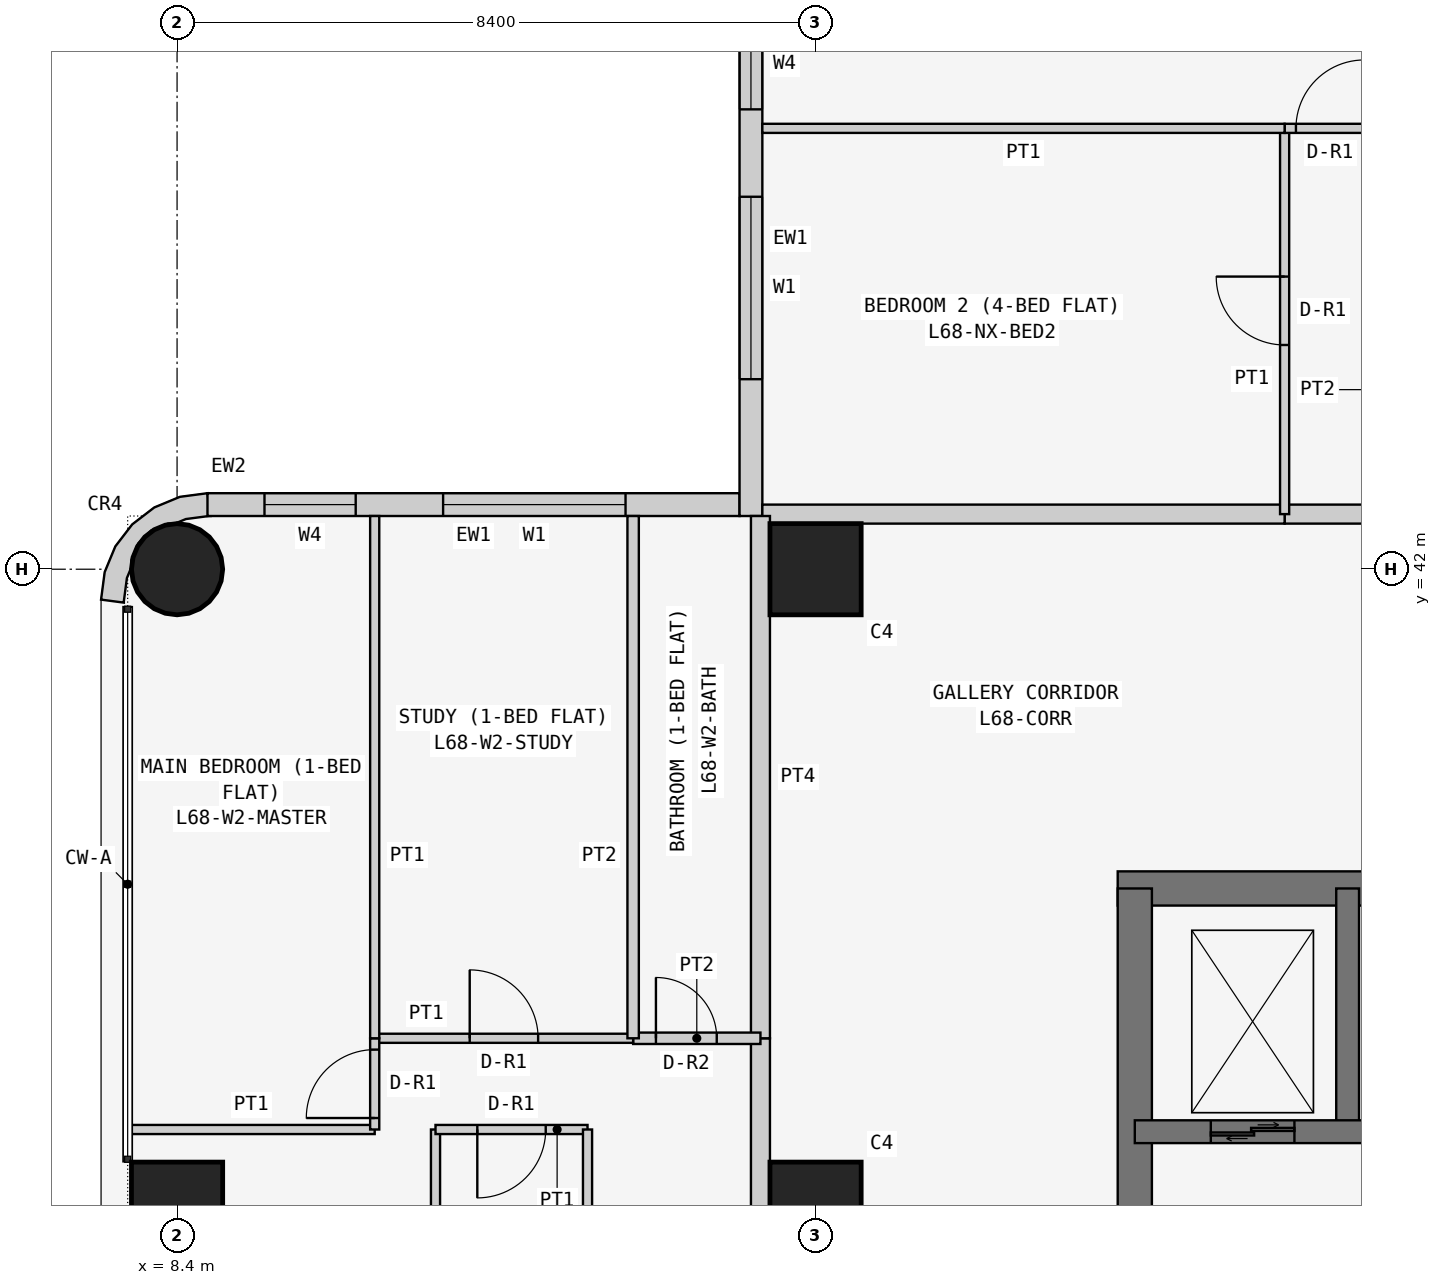
"""IFC4 building model, lengths in metres.
Left out: names, types, materials, properties, quantities, classifications, styles, units other than length and angle.
Written with IfcOpenShell. Run it as: python <this file> out.ifc"""

import sys

from ifc_helpers import new_model, si_unit, direction, frame, frame_2d, origin, origin_2d, place, context, subcontext, project, spatial, polyline, rectangle, circle, outline, extrude, element, fill, save


model = new_model("IFC4")
c1 = context("Model", 3, precision=1e-05, world=origin(), true_north=direction((0.0, 1.0)))
c2 = subcontext(c1, "Body", "Model", "MODEL_VIEW")
j1 = project(units=[si_unit("LENGTHUNIT", "METRE"), si_unit("PLANEANGLEUNIT", "RADIAN")], contexts=[c1])
p1 = place(None, origin())
s1 = spatial("IfcSite", under=j1, at=p1, CompositionType="ELEMENT")
p2 = place(p1, origin())
s2 = spatial("IfcBuilding", under=s1, at=p2, CompositionType="ELEMENT")
p3 = place(p2, frame((0.0, 0.0, 261.3)))
s3 = spatial("IfcBuildingStorey", under=s2, at=p3, CompositionType="ELEMENT", Elevation=261.3)
p4 = place(p3, frame((8.4, 33.6, 0.0), z_axis=(0.0, 0.0, 1.0), x_axis=(1.0, 0.0, 0.0)))
e1 = element("IfcColumn", 1, at=p4, inside=s3, PredefinedType="COLUMN", context=c2, shape_type="SweptSolid", body=[
    extrude(rectangle(XDim=1.2, YDim=1.2, at=origin_2d()), origin(), (0.0, 0.0, 1.0), 3.6),
])
p5 = place(p3, frame((8.4, 42.0, 0.0), z_axis=(0.0, 0.0, 1.0), x_axis=(1.0, 0.0, 0.0)))
e2 = element("IfcColumn", 2, at=p5, inside=s3, PredefinedType="COLUMN", context=c2, shape_type="SweptSolid", body=[
    extrude(circle(Radius=0.6, at=origin_2d()), origin(), (0.0, 0.0, 1.0), 3.6),
])
for number, where, z_axis, x_axis in (
    (3, (16.8, 33.6, 0.0), (0.0, 0.0, 1.0), (1.0, 0.0, 0.0)),
    (4, (16.8, 42.0, 0.0), (0.0, 0.0, 1.0), (1.0, 0.0, 0.0)),
):
    element("IfcColumn", number, at=place(p3, frame(where, z_axis=z_axis, x_axis=x_axis)), inside=s3, PredefinedType="COLUMN", context=c2, shape_type="SweptSolid", body=[
        extrude(rectangle(XDim=1.2, YDim=1.2, at=origin_2d()), origin(), (0.0, 0.0, 1.0), 3.6),
    ])
p6 = place(p3, frame((37.8, 37.8, 0.0), z_axis=(0.0, 0.0, 1.0), x_axis=(-1.0, 0.0, 0.0)))
e5 = element("IfcWall", 5, at=p6, inside=s3, PredefinedType="SHEAR", context=c2, shape_type="SweptSolid", body=[
    extrude(rectangle(XDim=17.025, YDim=0.45, at=frame_2d((8.513, 0.0))), origin(), (0.0, 0.0, 1.0), 3.6),
])
p7 = place(p3, frame((21.0, 37.8, 0.0), z_axis=(0.0, 0.0, 1.0), x_axis=(0.0, -1.0, 0.0)))
e6 = element("IfcWall", 6, at=p7, inside=s3, PredefinedType="SHEAR", context=c2, shape_type="SweptSolid", body=[
    extrude(rectangle(XDim=17.025, YDim=0.45, at=frame_2d((8.513, 0.0))), origin(), (0.0, 0.0, 1.0), 3.6),
])
p8 = place(p7, frame((5.4, 0.0, 0.0)))
e7 = element("IfcOpeningElement", 7, at=p8, cuts=e6, PredefinedType="OPENING", context=c2, shape_type="SweptSolid", body=[
    extrude(rectangle(XDim=1.2, YDim=2.1, at=frame_2d((0.6, 1.05))), frame((0.0, 0.235, 0.0), z_axis=(0.0, -1.0, 0.0), x_axis=(1.0, 0.0, 0.0)), (0.0, 0.0, 1.0), 0.47),
])
p9 = place(p3, frame((21.0, 34.6, 0.0), z_axis=(0.0, 0.0, 1.0), x_axis=(1.0, 0.0, 0.0)))
e8 = element("IfcWall", 8, at=p9, inside=s3, PredefinedType="SHEAR", context=c2, shape_type="SweptSolid", body=[
    extrude(rectangle(XDim=11.2, YDim=0.3, at=frame_2d((5.6, 0.0))), origin(), (0.0, 0.0, 1.0), 3.6),
])
p10 = place(p9, frame((9.35, 0.0, 0.0)))
e9 = element("IfcOpeningElement", 9, at=p10, cuts=e8, PredefinedType="OPENING", context=c2, shape_type="SweptSolid", body=[
    extrude(rectangle(XDim=0.9, YDim=2.1, at=frame_2d((0.45, 1.05))), frame((0.0, 0.16, 0.0), z_axis=(0.0, -1.0, 0.0), x_axis=(1.0, 0.0, 0.0)), (0.0, 0.0, 1.0), 0.32),
])
p11 = place(p9, frame((1.0, 0.0, 0.0)))
e10 = element("IfcOpeningElement", 10, at=p11, cuts=e8, PredefinedType="OPENING", context=c2, shape_type="SweptSolid", body=[
    extrude(rectangle(XDim=1.1, YDim=2.1, at=frame_2d((0.55, 1.05))), frame((0.0, 0.16, 0.0), z_axis=(0.0, -1.0, 0.0), x_axis=(1.0, 0.0, 0.0)), (0.0, 0.0, 1.0), 0.32),
])
p12 = place(p9, frame((3.65, 0.0, 0.0)))
e11 = element("IfcOpeningElement", 11, at=p12, cuts=e8, PredefinedType="OPENING", context=c2, shape_type="SweptSolid", body=[
    extrude(rectangle(XDim=1.1, YDim=2.1, at=frame_2d((0.55, 1.05))), frame((0.0, 0.16, 0.0), z_axis=(0.0, -1.0, 0.0), x_axis=(1.0, 0.0, 0.0)), (0.0, 0.0, 1.0), 0.32),
])
p13 = place(p9, frame((6.35, 0.0, 0.0)))
e12 = element("IfcOpeningElement", 12, at=p13, cuts=e8, PredefinedType="OPENING", context=c2, shape_type="SweptSolid", body=[
    extrude(rectangle(XDim=1.3, YDim=2.1, at=frame_2d((0.65, 1.05))), frame((0.0, 0.16, 0.0), z_axis=(0.0, -1.0, 0.0), x_axis=(1.0, 0.0, 0.0)), (0.0, 0.0, 1.0), 0.32),
])
p14 = place(p3, frame((23.8, 34.6, 0.0), z_axis=(0.0, 0.0, 1.0), x_axis=(0.0, 1.0, 0.0)))
e13 = element("IfcWall", 13, at=p14, inside=s3, PredefinedType="SHEAR", context=c2, shape_type="SweptSolid", body=[
    extrude(rectangle(XDim=3.2, YDim=0.3, at=frame_2d((1.6, 0.0))), origin(), (0.0, 0.0, 1.0), 3.6),
])
p15 = place(p3, frame((15.8, 42.85, 0.0), z_axis=(0.0, 0.0, 1.0), x_axis=(-1.0, 0.0, 0.0)))
e14 = element("IfcWall", 14, at=p15, inside=s3, PredefinedType="SOLIDWALL", context=c2, shape_type="SweptSolid", body=[
    extrude(rectangle(XDim=7.0, YDim=0.3, at=frame_2d((3.5, 0.0))), origin(), (0.0, 0.0, 1.0), 3.45),
])
p16 = place(p15, frame((1.5, 0.0, 0.9)))
e15 = element("IfcOpeningElement", 15, at=p16, cuts=e14, PredefinedType="OPENING", context=c2, shape_type="SweptSolid", body=[
    extrude(rectangle(XDim=2.4, YDim=1.5, at=frame_2d((1.2, 0.75))), frame((0.0, 0.16, 0.0), z_axis=(0.0, -1.0, 0.0), x_axis=(1.0, 0.0, 0.0)), (0.0, 0.0, 1.0), 0.32),
])
p17 = place(p15, frame((5.05, 0.0, 0.9)))
e16 = element("IfcOpeningElement", 16, at=p17, cuts=e14, PredefinedType="OPENING", context=c2, shape_type="SweptSolid", body=[
    extrude(rectangle(XDim=1.2, YDim=1.5, at=frame_2d((0.6, 0.75))), frame((0.0, 0.16, 0.0), z_axis=(0.0, -1.0, 0.0), x_axis=(1.0, 0.0, 0.0)), (0.0, 0.0, 1.0), 0.32),
])
p18 = place(p3, frame((15.95, 50.0, 0.0), z_axis=(0.0, 0.0, 1.0), x_axis=(0.0, -1.0, 0.0)))
e17 = element("IfcWall", 17, at=p18, inside=s3, PredefinedType="SOLIDWALL", context=c2, shape_type="SweptSolid", body=[
    extrude(rectangle(XDim=7.3, YDim=0.3, at=frame_2d((3.65, 0.0))), origin(), (0.0, 0.0, 1.0), 3.45),
])
p19 = place(p18, frame((3.1, 0.0, 0.9)))
e18 = element("IfcOpeningElement", 18, at=p19, cuts=e17, PredefinedType="OPENING", context=c2, shape_type="SweptSolid", body=[
    extrude(rectangle(XDim=2.4, YDim=1.5, at=frame_2d((1.2, 0.75))), frame((0.0, 0.16, 0.0), z_axis=(0.0, -1.0, 0.0), x_axis=(1.0, 0.0, 0.0)), (0.0, 0.0, 1.0), 0.32),
])
p20 = place(p18, frame((0.75, 0.0, 0.9)))
e19 = element("IfcOpeningElement", 19, at=p20, cuts=e17, PredefinedType="OPENING", context=c2, shape_type="SweptSolid", body=[
    extrude(rectangle(XDim=1.2, YDim=1.5, at=frame_2d((0.6, 0.75))), frame((0.0, 0.16, 0.0), z_axis=(0.0, -1.0, 0.0), x_axis=(1.0, 0.0, 0.0)), (0.0, 0.0, 1.0), 0.32),
])
p21 = place(p3, frame((8.762, 42.576, 0.0), z_axis=(0.0, 0.0, 1.0), x_axis=(-0.707106781187, 0.707106781187, 0.0)))
e20 = element("IfcWall", 20, at=p21, inside=s3, PredefinedType="SOLIDWALL", context=c2, shape_type="SweptSolid", body=[
    extrude(outline(polyline([(0.233, 0.114), (0.047, -0.129), (0.033, -0.143), (0.273, -0.327), (0.495, -0.037), (0.635, 0.3), (0.683, 0.663), (0.635, 1.025), (0.495, 1.363), (0.273, 1.653), (0.033, 1.469), (0.047, 1.455), (0.233, 1.212), (0.292, 1.069), (0.358, 1.003), (0.449, 0.783), (0.449, 0.543), (0.358, 0.322), (0.292, 0.257), (0.233, 0.114)])), origin(), (0.0, 0.0, 1.0), 3.45),
])
p22 = place(p3, frame((22.971, 42.725, 0.0), z_axis=(0.0, 0.0, 1.0), x_axis=(1.0, 0.0, 0.0)))
e21 = element("IfcWall", 21, at=p22, inside=s3, PredefinedType="PARTITIONING", context=c2, shape_type="SweptSolid", body=[
    extrude(rectangle(XDim=1.2, YDim=0.25, at=frame_2d((0.6, 0.0))), origin(), (0.0, 0.0, 1.0), 3.45),
])
p23 = place(p3, frame((16.1, 42.725, 0.0), z_axis=(0.0, 0.0, 1.0), x_axis=(1.0, 0.0, 0.0)))
e22 = element("IfcWall", 22, at=p23, inside=s3, PredefinedType="PARTITIONING", context=c2, shape_type="SweptSolid", body=[
    extrude(rectangle(XDim=6.871, YDim=0.25, at=frame_2d((3.436, 0.0))), origin(), (0.0, 0.0, 1.0), 3.45),
])
p24 = place(p3, frame((16.075, 29.4, 0.0), z_axis=(0.0, 0.0, 1.0), x_axis=(0.0, 1.0, 0.0)))
e23 = element("IfcWall", 23, at=p24, inside=s3, PredefinedType="PARTITIONING", context=c2, shape_type="SweptSolid", body=[
    extrude(rectangle(XDim=6.429, YDim=0.25, at=frame_2d((3.215, 0.0))), origin(), (0.0, 0.0, 1.0), 3.45),
])
p25 = place(p24, frame((0.5, 0.0, 0.0)))
e24 = element("IfcOpeningElement", 24, at=p25, cuts=e23, PredefinedType="OPENING", context=c2, shape_type="SweptSolid", body=[
    extrude(rectangle(XDim=1.0, YDim=2.1, at=frame_2d((0.5, 1.05))), frame((0.0, 0.135, 0.0), z_axis=(0.0, -1.0, 0.0), x_axis=(1.0, 0.0, 0.0)), (0.0, 0.0, 1.0), 0.27),
])
p26 = place(p3, frame((16.075, 35.829, 0.0), z_axis=(0.0, 0.0, 1.0), x_axis=(0.0, 1.0, 0.0)))
e25 = element("IfcWall", 25, at=p26, inside=s3, PredefinedType="PARTITIONING", context=c2, shape_type="SweptSolid", body=[
    extrude(rectangle(XDim=6.871, YDim=0.25, at=frame_2d((3.436, 0.0))), origin(), (0.0, 0.0, 1.0), 3.45),
])
p27 = place(p3, frame((22.971, 42.725, 0.0), z_axis=(0.0, 0.0, 1.0), x_axis=(0.0, 1.0, 0.0)))
e26 = element("IfcWall", 26, at=p27, inside=s3, PredefinedType="PARTITIONING", context=c2, shape_type="SweptSolid", body=[
    extrude(rectangle(XDim=5.075, YDim=0.12, at=frame_2d((2.538, 0.0))), origin(), (0.0, 0.0, 1.0), 3.45),
])
p28 = place(p27, frame((2.225, 0.0, 0.0)))
e27 = element("IfcOpeningElement", 27, at=p28, cuts=e26, PredefinedType="OPENING", context=c2, shape_type="SweptSolid", body=[
    extrude(rectangle(XDim=0.9, YDim=2.1, at=frame_2d((0.45, 1.05))), frame((0.0, 0.07, 0.0), z_axis=(0.0, -1.0, 0.0), x_axis=(1.0, 0.0, 0.0)), (0.0, 0.0, 1.0), 0.14),
])
p29 = place(p3, frame((22.971, 47.8, 0.0), z_axis=(0.0, 0.0, 1.0), x_axis=(1.0, 0.0, 0.0)))
e28 = element("IfcWall", 28, at=p29, inside=s3, PredefinedType="PARTITIONING", context=c2, shape_type="SweptSolid", body=[
    extrude(rectangle(XDim=1.2, YDim=0.12, at=frame_2d((0.6, 0.0))), origin(), (0.0, 0.0, 1.0), 3.45),
])
p30 = place(p29, frame((0.149, 0.0, 0.0)))
e29 = element("IfcOpeningElement", 29, at=p30, cuts=e28, PredefinedType="OPENING", context=c2, shape_type="SweptSolid", body=[
    extrude(rectangle(XDim=0.9, YDim=2.1, at=frame_2d((0.45, 1.05))), frame((0.0, 0.07, 0.0), z_axis=(0.0, -1.0, 0.0), x_axis=(1.0, 0.0, 0.0)), (0.0, 0.0, 1.0), 0.14),
])
p31 = place(p3, frame((22.971, 47.8, 0.0), z_axis=(0.0, 0.0, 1.0), x_axis=(-1.0, 0.0, 0.0)))
e30 = element("IfcWall", 30, at=p31, inside=s3, PredefinedType="PARTITIONING", context=c2, shape_type="SweptSolid", body=[
    extrude(rectangle(XDim=6.871, YDim=0.12, at=frame_2d((3.436, 0.0))), origin(), (0.0, 0.0, 1.0), 3.45),
])
p32 = place(p3, frame((11.8, 29.4, 0.0), z_axis=(0.0, 0.0, 1.0), x_axis=(0.0, 1.0, 0.0)))
e31 = element("IfcWall", 31, at=p32, inside=s3, PredefinedType="PARTITIONING", context=c2, shape_type="SweptSolid", body=[
    extrude(rectangle(XDim=5.229, YDim=0.12, at=frame_2d((2.615, 0.0))), origin(), (0.0, 0.0, 1.0), 3.45),
])
p33 = place(p3, frame((11.8, 34.629, 0.0), z_axis=(0.0, 0.0, 1.0), x_axis=(1.0, 0.0, 0.0)))
e32 = element("IfcWall", 32, at=p33, inside=s3, PredefinedType="PARTITIONING", context=c2, shape_type="SweptSolid", body=[
    extrude(rectangle(XDim=2.0, YDim=0.12, at=frame_2d((1.0, 0.0))), origin(), (0.0, 0.0, 1.0), 3.45),
])
p34 = place(p33, frame((0.55, 0.0, 0.0)))
e33 = element("IfcOpeningElement", 33, at=p34, cuts=e32, PredefinedType="OPENING", context=c2, shape_type="SweptSolid", body=[
    extrude(rectangle(XDim=0.9, YDim=2.1, at=frame_2d((0.45, 1.05))), frame((0.0, 0.07, 0.0), z_axis=(0.0, -1.0, 0.0), x_axis=(1.0, 0.0, 0.0)), (0.0, 0.0, 1.0), 0.14),
])
p35 = place(p3, frame((13.8, 34.629, 0.0), z_axis=(0.0, 0.0, 1.0), x_axis=(0.0, -1.0, 0.0)))
e34 = element("IfcWall", 34, at=p35, inside=s3, PredefinedType="PARTITIONING", context=c2, shape_type="SweptSolid", body=[
    extrude(rectangle(XDim=5.229, YDim=0.12, at=frame_2d((2.615, 0.0))), origin(), (0.0, 0.0, 1.0), 3.45),
])
p36 = place(p3, frame((14.4, 35.829, 0.0), z_axis=(0.0, 0.0, 1.0), x_axis=(1.0, 0.0, 0.0)))
e35 = element("IfcWall", 35, at=p36, inside=s3, PredefinedType="PARTITIONING", context=c2, shape_type="SweptSolid", body=[
    extrude(rectangle(XDim=1.675, YDim=0.15, at=frame_2d((0.837, 0.0))), origin(), (0.0, 0.0, 1.0), 3.45),
])
p37 = place(p36, frame((0.3, 0.0, 0.0)))
e36 = element("IfcOpeningElement", 36, at=p37, cuts=e35, PredefinedType="OPENING", context=c2, shape_type="SweptSolid", body=[
    extrude(rectangle(XDim=0.8, YDim=2.1, at=frame_2d((0.4, 1.05))), frame((0.0, 0.085, 0.0), z_axis=(0.0, -1.0, 0.0), x_axis=(1.0, 0.0, 0.0)), (0.0, 0.0, 1.0), 0.17),
])
p38 = place(p3, frame((11.0, 35.829, 0.0), z_axis=(0.0, 0.0, 1.0), x_axis=(1.0, 0.0, 0.0)))
e37 = element("IfcWall", 37, at=p38, inside=s3, PredefinedType="PARTITIONING", context=c2, shape_type="SweptSolid", body=[
    extrude(rectangle(XDim=3.4, YDim=0.12, at=frame_2d((1.7, 0.0))), origin(), (0.0, 0.0, 1.0), 3.45),
])
p39 = place(p38, frame((1.25, 0.0, 0.0)))
e38 = element("IfcOpeningElement", 38, at=p39, cuts=e37, PredefinedType="OPENING", context=c2, shape_type="SweptSolid", body=[
    extrude(rectangle(XDim=0.9, YDim=2.1, at=frame_2d((0.45, 1.05))), frame((0.0, 0.07, 0.0), z_axis=(0.0, -1.0, 0.0), x_axis=(1.0, 0.0, 0.0)), (0.0, 0.0, 1.0), 0.14),
])
p40 = place(p3, frame((7.75, 34.629, 0.0), z_axis=(0.0, 0.0, 1.0), x_axis=(1.0, 0.0, 0.0)))
e39 = element("IfcWall", 39, at=p40, inside=s3, PredefinedType="PARTITIONING", context=c2, shape_type="SweptSolid", body=[
    extrude(rectangle(XDim=3.25, YDim=0.12, at=frame_2d((1.625, 0.0))), origin(), (0.0, 0.0, 1.0), 3.45),
])
p41 = place(p3, frame((11.0, 34.629, 0.0), z_axis=(0.0, 0.0, 1.0), x_axis=(0.0, 1.0, 0.0)))
e40 = element("IfcWall", 40, at=p41, inside=s3, PredefinedType="PARTITIONING", context=c2, shape_type="SweptSolid", body=[
    extrude(rectangle(XDim=1.2, YDim=0.12, at=frame_2d((0.6, 0.0))), origin(), (0.0, 0.0, 1.0), 3.45),
])
p42 = place(p41, frame((0.151, 0.0, 0.0)))
e41 = element("IfcOpeningElement", 41, at=p42, cuts=e40, PredefinedType="OPENING", context=c2, shape_type="SweptSolid", body=[
    extrude(rectangle(XDim=0.9, YDim=2.1, at=frame_2d((0.45, 1.05))), frame((0.0, 0.07, 0.0), z_axis=(0.0, -1.0, 0.0), x_axis=(1.0, 0.0, 0.0)), (0.0, 0.0, 1.0), 0.14),
])
p43 = place(p3, frame((14.4, 35.829, 0.0), z_axis=(0.0, 0.0, 1.0), x_axis=(0.0, 1.0, 0.0)))
e42 = element("IfcWall", 42, at=p43, inside=s3, PredefinedType="PARTITIONING", context=c2, shape_type="SweptSolid", body=[
    extrude(rectangle(XDim=6.871, YDim=0.15, at=frame_2d((3.436, 0.0))), origin(), (0.0, 0.0, 1.0), 3.45),
])
p44 = place(p3, frame((11.0, 35.829, 0.0), z_axis=(0.0, 0.0, 1.0), x_axis=(0.0, 1.0, 0.0)))
e43 = element("IfcWall", 43, at=p44, inside=s3, PredefinedType="PARTITIONING", context=c2, shape_type="SweptSolid", body=[
    extrude(rectangle(XDim=6.871, YDim=0.12, at=frame_2d((3.436, 0.0))), origin(), (0.0, 0.0, 1.0), 3.45),
])
p45 = place(p19, origin())
e44 = element("IfcWindow", 44, at=p45, inside=s3, PartitioningType="SINGLE_PANEL", PredefinedType="WINDOW", context=c2, shape_type="SweptSolid", body=[
    extrude(rectangle(XDim=2.4, YDim=1.5, at=frame_2d((1.2, 0.75))), frame((0.0, 0.03, 0.0), z_axis=(0.0, -1.0, 0.0), x_axis=(1.0, 0.0, 0.0)), (0.0, 0.0, 1.0), 0.06),
])
fill(e18, e44)
p46 = place(p20, origin())
e45 = element("IfcWindow", 45, at=p46, inside=s3, PartitioningType="SINGLE_PANEL", PredefinedType="WINDOW", context=c2, shape_type="SweptSolid", body=[
    extrude(rectangle(XDim=1.2, YDim=1.5, at=frame_2d((0.6, 0.75))), frame((0.0, 0.03, 0.0), z_axis=(0.0, -1.0, 0.0), x_axis=(1.0, 0.0, 0.0)), (0.0, 0.0, 1.0), 0.06),
])
fill(e19, e45)
p47 = place(p16, origin())
e46 = element("IfcWindow", 46, at=p47, inside=s3, PartitioningType="SINGLE_PANEL", PredefinedType="WINDOW", context=c2, shape_type="SweptSolid", body=[
    extrude(rectangle(XDim=2.4, YDim=1.5, at=frame_2d((1.2, 0.75))), frame((0.0, 0.03, 0.0), z_axis=(0.0, -1.0, 0.0), x_axis=(1.0, 0.0, 0.0)), (0.0, 0.0, 1.0), 0.06),
])
fill(e15, e46)
p48 = place(p17, origin())
e47 = element("IfcWindow", 47, at=p48, inside=s3, PartitioningType="SINGLE_PANEL", PredefinedType="WINDOW", context=c2, shape_type="SweptSolid", body=[
    extrude(rectangle(XDim=1.2, YDim=1.5, at=frame_2d((0.6, 0.75))), frame((0.0, 0.03, 0.0), z_axis=(0.0, -1.0, 0.0), x_axis=(1.0, 0.0, 0.0)), (0.0, 0.0, 1.0), 0.06),
])
fill(e16, e47)
p49 = place(p28, origin())
e48 = element("IfcDoor", 48, at=p49, inside=s3, OperationType="SINGLE_SWING_RIGHT", PredefinedType="DOOR", context=c2, shape_type="SweptSolid", body=[
    extrude(rectangle(XDim=0.9, YDim=2.1, at=frame_2d((0.45, 1.05))), frame((0.0, 0.025, 0.0), z_axis=(0.0, -1.0, 0.0), x_axis=(1.0, 0.0, 0.0)), (0.0, 0.0, 1.0), 0.05),
])
fill(e27, e48)
p50 = place(p30, origin())
e49 = element("IfcDoor", 49, at=p50, inside=s3, OperationType="SINGLE_SWING_RIGHT", PredefinedType="DOOR", context=c2, shape_type="SweptSolid", body=[
    extrude(rectangle(XDim=0.9, YDim=2.1, at=frame_2d((0.45, 1.05))), frame((0.0, 0.025, 0.0), z_axis=(0.0, -1.0, 0.0), x_axis=(1.0, 0.0, 0.0)), (0.0, 0.0, 1.0), 0.05),
])
fill(e29, e49)
p51 = place(p34, frame((0.9, 0.0, 0.0), z_axis=(0.0, 0.0, 1.0), x_axis=(-1.0, 0.0, 0.0)))
e50 = element("IfcDoor", 50, at=p51, inside=s3, OperationType="SINGLE_SWING_RIGHT", PredefinedType="DOOR", context=c2, shape_type="SweptSolid", body=[
    extrude(rectangle(XDim=0.9, YDim=2.1, at=frame_2d((0.45, 1.05))), frame((0.0, 0.025, 0.0), z_axis=(0.0, -1.0, 0.0), x_axis=(1.0, 0.0, 0.0)), (0.0, 0.0, 1.0), 0.05),
])
fill(e33, e50)
p52 = place(p37, origin())
e51 = element("IfcDoor", 51, at=p52, inside=s3, OperationType="SINGLE_SWING_LEFT", PredefinedType="DOOR", context=c2, shape_type="SweptSolid", body=[
    extrude(rectangle(XDim=0.8, YDim=2.1, at=frame_2d((0.4, 1.05))), frame((0.0, 0.025, 0.0), z_axis=(0.0, -1.0, 0.0), x_axis=(1.0, 0.0, 0.0)), (0.0, 0.0, 1.0), 0.05),
])
fill(e36, e51)
p53 = place(p39, origin())
e52 = element("IfcDoor", 52, at=p53, inside=s3, OperationType="SINGLE_SWING_LEFT", PredefinedType="DOOR", context=c2, shape_type="SweptSolid", body=[
    extrude(rectangle(XDim=0.9, YDim=2.1, at=frame_2d((0.45, 1.05))), frame((0.0, 0.025, 0.0), z_axis=(0.0, -1.0, 0.0), x_axis=(1.0, 0.0, 0.0)), (0.0, 0.0, 1.0), 0.05),
])
fill(e38, e52)
p54 = place(p42, origin())
e53 = element("IfcDoor", 53, at=p54, inside=s3, OperationType="SINGLE_SWING_LEFT", PredefinedType="DOOR", context=c2, shape_type="SweptSolid", body=[
    extrude(rectangle(XDim=0.9, YDim=2.1, at=frame_2d((0.45, 1.05))), frame((0.0, 0.025, 0.0), z_axis=(0.0, -1.0, 0.0), x_axis=(1.0, 0.0, 0.0)), (0.0, 0.0, 1.0), 0.05),
])
fill(e41, e53)
p55 = place(p11, origin())
e54 = element("IfcDoor", 54, at=p55, inside=s3, OperationType="DOUBLE_DOOR_SLIDING", PredefinedType="DOOR", context=c2, shape_type="SweptSolid", body=[
    extrude(rectangle(XDim=1.1, YDim=2.1, at=frame_2d((0.55, 1.05))), frame((0.0, 0.025, 0.0), z_axis=(0.0, -1.0, 0.0), x_axis=(1.0, 0.0, 0.0)), (0.0, 0.0, 1.0), 0.05),
])
fill(e10, e54)
save(model, sys.argv[1])
